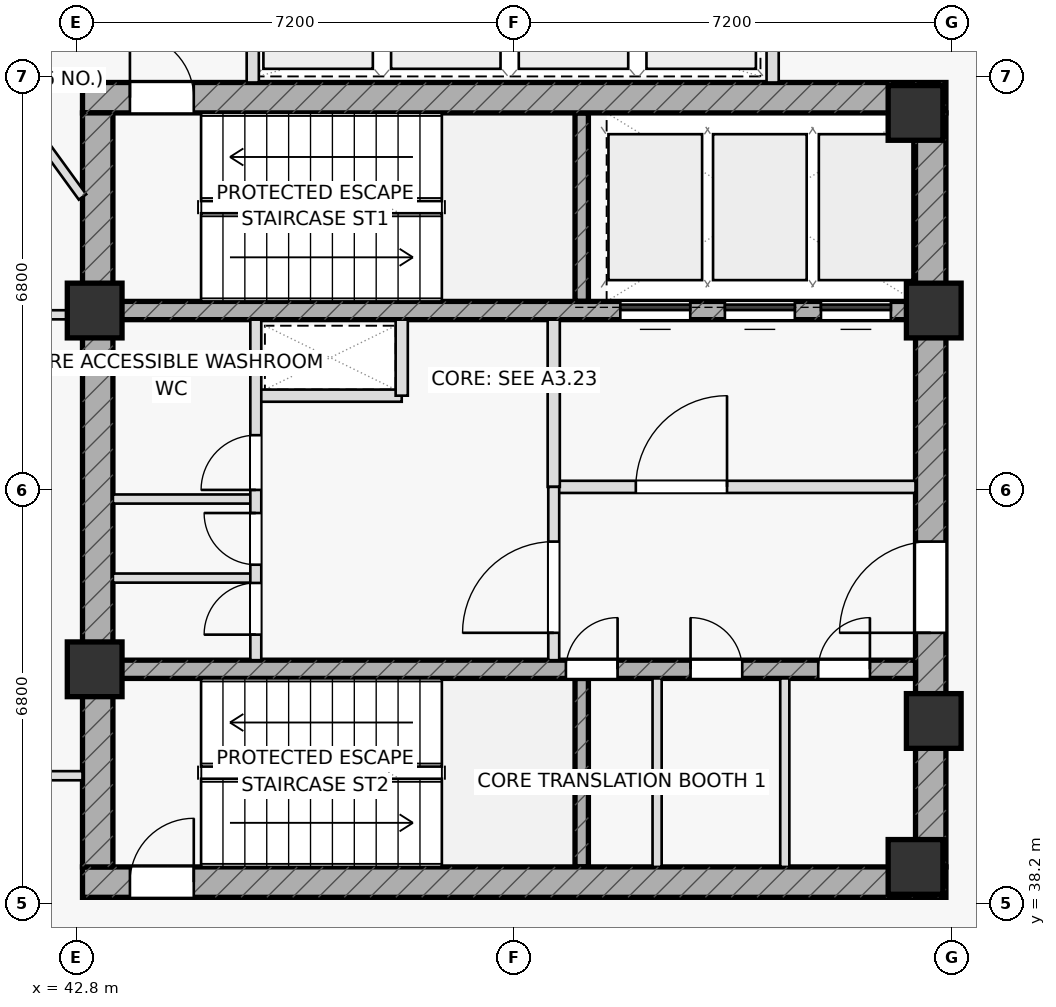
"""IFC4 building model, lengths in metres.
Left out: names, types, materials, properties, quantities, classifications, styles, units other than length and angle.
Written with IfcOpenShell. Run it as: python <this file> out.ifc"""

import sys

from ifc_helpers import new_model, si_unit, direction, frame, frame_2d, origin, origin_2d, place, context, subcontext, project, spatial, rectangle, extrude, element, fill, save


model = new_model("IFC4")
c1 = context("Model", 3, precision=1e-05, world=origin(), true_north=direction((0.0, 1.0)))
c2 = subcontext(c1, "Body", "Model", "MODEL_VIEW")
j1 = project(units=[si_unit("LENGTHUNIT", "METRE"), si_unit("PLANEANGLEUNIT", "RADIAN")], contexts=[c1])
p1 = place(None, origin())
s1 = spatial("IfcSite", under=j1, at=p1, CompositionType="ELEMENT")
p2 = place(p1, origin())
s2 = spatial("IfcBuilding", under=s1, at=p2, CompositionType="ELEMENT")
p3 = place(p2, frame((0.0, 0.0, 273.5)))
s3 = spatial("IfcBuildingStorey", under=s2, at=p3, CompositionType="ELEMENT", Elevation=273.5)
for number, where, z_axis, x_axis in (
    (1, (51.11, 48.1, 0.0), (0.0, 0.0, 1.0), (0.0, 1.0, 0.0)),
    (2, (51.11, 38.8, 0.0), (0.0, 0.0, 1.0), (0.0, 1.0, 0.0)),
):
    element("IfcWall", number, at=place(p3, frame(where, z_axis=z_axis, x_axis=x_axis)), inside=s3, PredefinedType="SHEAR", context=c2, shape_type="SweptSolid", body=[
        extrude(rectangle(XDim=3.1, YDim=0.22, at=frame_2d((1.55, 0.0))), origin(), (0.0, 0.0, 1.0), 3.7),
    ])
p4 = place(p3, frame((42.9, 51.45, 0.0), z_axis=(0.0, 0.0, 1.0), x_axis=(1.0, 0.0, 0.0)))
e3 = element("IfcWall", 3, at=p4, inside=s3, PredefinedType="SHEAR", context=c2, shape_type="SweptSolid", body=[
    extrude(rectangle(XDim=14.2, YDim=0.5, at=frame_2d((7.1, 0.0))), origin(), (0.0, 0.0, 1.0), 3.7),
])
p5 = place(p4, frame((0.78, 0.0, 0.0)))
e4 = element("IfcOpeningElement", 4, at=p5, cuts=e3, PredefinedType="OPENING", context=c2, shape_type="SweptSolid", body=[
    extrude(rectangle(XDim=1.05, YDim=2.2, at=frame_2d((0.525, 1.1))), frame((0.0, 0.26, 0.0), z_axis=(0.0, -1.0, 0.0), x_axis=(1.0, 0.0, 0.0)), (0.0, 0.0, 1.0), 0.52),
])
p6 = place(p3, frame((42.9, 38.55, 0.0), z_axis=(0.0, 0.0, 1.0), x_axis=(1.0, 0.0, 0.0)))
e5 = element("IfcWall", 5, at=p6, inside=s3, PredefinedType="SHEAR", context=c2, shape_type="SweptSolid", body=[
    extrude(rectangle(XDim=14.2, YDim=0.5, at=frame_2d((7.1, 0.0))), origin(), (0.0, 0.0, 1.0), 3.7),
])
p7 = place(p6, frame((0.78, 0.0, 0.0)))
e6 = element("IfcOpeningElement", 6, at=p7, cuts=e5, PredefinedType="OPENING", context=c2, shape_type="SweptSolid", body=[
    extrude(rectangle(XDim=1.05, YDim=2.2, at=frame_2d((0.525, 1.1))), frame((0.0, 0.26, 0.0), z_axis=(0.0, -1.0, 0.0), x_axis=(1.0, 0.0, 0.0)), (0.0, 0.0, 1.0), 0.52),
])
p8 = place(p3, frame((43.15, 38.8, 0.0), z_axis=(0.0, 0.0, 1.0), x_axis=(0.0, 1.0, 0.0)))
e7 = element("IfcWall", 7, at=p8, inside=s3, PredefinedType="SHEAR", context=c2, shape_type="SweptSolid", body=[
    extrude(rectangle(XDim=12.4, YDim=0.5, at=frame_2d((6.2, 0.0))), origin(), (0.0, 0.0, 1.0), 3.7),
])
p9 = place(p3, frame((56.85, 38.8, 0.0), z_axis=(0.0, 0.0, 1.0), x_axis=(0.0, 1.0, 0.0)))
e8 = element("IfcWall", 8, at=p9, inside=s3, PredefinedType="SHEAR", context=c2, shape_type="SweptSolid", body=[
    extrude(rectangle(XDim=12.4, YDim=0.5, at=frame_2d((6.2, 0.0))), origin(), (0.0, 0.0, 1.0), 3.7),
])
p10 = place(p9, frame((3.85, 0.0, 0.0)))
e9 = element("IfcOpeningElement", 9, at=p10, cuts=e8, PredefinedType="OPENING", context=c2, shape_type="SweptSolid", body=[
    extrude(rectangle(XDim=1.5, YDim=2.2, at=frame_2d((0.75, 1.1))), frame((0.0, 0.26, 0.0), z_axis=(0.0, -1.0, 0.0), x_axis=(1.0, 0.0, 0.0)), (0.0, 0.0, 1.0), 0.52),
])
p11 = place(p3, frame((43.4, 47.95, 0.0), z_axis=(0.0, 0.0, 1.0), x_axis=(1.0, 0.0, 0.0)))
e10 = element("IfcWall", 10, at=p11, inside=s3, PredefinedType="SHEAR", context=c2, shape_type="SweptSolid", body=[
    extrude(rectangle(XDim=13.2, YDim=0.3, at=frame_2d((6.6, 0.0))), origin(), (0.0, 0.0, 1.0), 3.7),
])
p12 = place(p11, frame((8.345, 0.0, 0.0)))
e11 = element("IfcOpeningElement", 11, at=p12, cuts=e10, PredefinedType="OPENING", context=c2, shape_type="SweptSolid", body=[
    extrude(rectangle(XDim=1.15, YDim=2.2, at=frame_2d((0.575, 1.1))), frame((0.0, 0.16, 0.0), z_axis=(0.0, -1.0, 0.0), x_axis=(1.0, 0.0, 0.0)), (0.0, 0.0, 1.0), 0.32),
])
p13 = place(p11, frame((10.065, 0.0, 0.0)))
e12 = element("IfcOpeningElement", 12, at=p13, cuts=e10, PredefinedType="OPENING", context=c2, shape_type="SweptSolid", body=[
    extrude(rectangle(XDim=1.15, YDim=2.2, at=frame_2d((0.575, 1.1))), frame((0.0, 0.16, 0.0), z_axis=(0.0, -1.0, 0.0), x_axis=(1.0, 0.0, 0.0)), (0.0, 0.0, 1.0), 0.32),
])
p14 = place(p11, frame((11.645, 0.0, 0.0)))
e13 = element("IfcOpeningElement", 13, at=p14, cuts=e10, PredefinedType="OPENING", context=c2, shape_type="SweptSolid", body=[
    extrude(rectangle(XDim=1.15, YDim=2.2, at=frame_2d((0.575, 1.1))), frame((0.0, 0.16, 0.0), z_axis=(0.0, -1.0, 0.0), x_axis=(1.0, 0.0, 0.0)), (0.0, 0.0, 1.0), 0.32),
])
p15 = place(p3, frame((43.4, 42.05, 0.0), z_axis=(0.0, 0.0, 1.0), x_axis=(1.0, 0.0, 0.0)))
e14 = element("IfcWall", 14, at=p15, inside=s3, PredefinedType="SHEAR", context=c2, shape_type="SweptSolid", body=[
    extrude(rectangle(XDim=13.2, YDim=0.3, at=frame_2d((6.6, 0.0))), origin(), (0.0, 0.0, 1.0), 3.7),
])
p16 = place(p15, frame((7.45, 0.0, 0.0)))
e15 = element("IfcOpeningElement", 15, at=p16, cuts=e14, PredefinedType="OPENING", context=c2, shape_type="SweptSolid", body=[
    extrude(rectangle(XDim=0.85, YDim=2.05, at=frame_2d((0.425, 1.025))), frame((0.0, 0.16, 0.0), z_axis=(0.0, -1.0, 0.0), x_axis=(1.0, 0.0, 0.0)), (0.0, 0.0, 1.0), 0.32),
])
p17 = place(p15, frame((9.5, 0.0, 0.0)))
e16 = element("IfcOpeningElement", 16, at=p17, cuts=e14, PredefinedType="OPENING", context=c2, shape_type="SweptSolid", body=[
    extrude(rectangle(XDim=0.85, YDim=2.05, at=frame_2d((0.425, 1.025))), frame((0.0, 0.16, 0.0), z_axis=(0.0, -1.0, 0.0), x_axis=(1.0, 0.0, 0.0)), (0.0, 0.0, 1.0), 0.32),
])
p18 = place(p15, frame((11.6, 0.0, 0.0)))
e17 = element("IfcOpeningElement", 17, at=p18, cuts=e14, PredefinedType="OPENING", context=c2, shape_type="SweptSolid", body=[
    extrude(rectangle(XDim=0.85, YDim=2.05, at=frame_2d((0.425, 1.025))), frame((0.0, 0.16, 0.0), z_axis=(0.0, -1.0, 0.0), x_axis=(1.0, 0.0, 0.0)), (0.0, 0.0, 1.0), 0.32),
])
for number, where, z_axis, x_axis in (
    (18, (43.1, 47.95, 0.0), (0.0, 0.0, 1.0), (1.0, 0.0, 0.0)),
    (19, (56.9, 47.95, 0.0), (0.0, 0.0, 1.0), (1.0, 0.0, 0.0)),
    (20, (56.6, 51.2, 0.0), (0.0, 0.0, 1.0), (1.0, 0.0, 0.0)),
    (21, (43.1, 42.05, 0.0), (0.0, 0.0, 1.0), (1.0, 0.0, 0.0)),
    (22, (56.9, 41.2, 0.0), (0.0, 0.0, 1.0), (1.0, 0.0, 0.0)),
    (23, (56.6, 38.8, 0.0), (0.0, 0.0, 1.0), (1.0, 0.0, 0.0)),
):
    element("IfcColumn", number, at=place(p3, frame(where, z_axis=z_axis, x_axis=x_axis)), inside=s3, PredefinedType="COLUMN", context=c2, shape_type="SweptSolid", body=[
        extrude(rectangle(XDim=0.9, YDim=0.9, at=origin_2d()), origin(), (0.0, 0.0, 1.0), 3.7),
    ])
for number, where, z_axis, x_axis in (
    (24, (45.7, 51.7, 0.0), (0.0, 0.0, 1.0), (0.0, 1.0, 0.0)),
    (25, (54.25, 51.7, 0.0), (0.0, 0.0, 1.0), (0.0, 1.0, 0.0)),
):
    element("IfcWall", number, at=place(p3, frame(where, z_axis=z_axis, x_axis=x_axis)), inside=s3, PredefinedType="PARTITIONING", context=c2, shape_type="SweptSolid", body=[
        extrude(rectangle(XDim=2.6, YDim=0.2, at=frame_2d((1.3, 0.0))), origin(), (0.0, 0.0, 1.0), 3.7),
    ])
p19 = place(p3, frame((45.75, 46.55, 0.0), z_axis=(0.0, 0.0, 1.0), x_axis=(1.0, 0.0, 0.0)))
e26 = element("IfcWall", 26, at=p19, inside=s3, PredefinedType="PARTITIONING", context=c2, shape_type="SweptSolid", body=[
    extrude(rectangle(XDim=2.4, YDim=0.2, at=frame_2d((1.2, 0.0))), origin(), (0.0, 0.0, 1.0), 3.7),
])
p20 = place(p3, frame((48.15, 46.55, 0.0), z_axis=(0.0, 0.0, 1.0), x_axis=(0.0, 1.0, 0.0)))
e27 = element("IfcWall", 27, at=p20, inside=s3, PredefinedType="PARTITIONING", context=c2, shape_type="SweptSolid", body=[
    extrude(rectangle(XDim=1.25, YDim=0.2, at=frame_2d((0.625, 0.0))), origin(), (0.0, 0.0, 1.0), 3.7),
])
p21 = place(p3, frame((50.65, 45.05, 0.0), z_axis=(0.0, 0.0, 1.0), x_axis=(1.0, 0.0, 0.0)))
e28 = element("IfcWall", 28, at=p21, inside=s3, PredefinedType="PARTITIONING", context=c2, shape_type="SweptSolid", body=[
    extrude(rectangle(XDim=5.95, YDim=0.2, at=frame_2d((2.975, 0.0))), origin(), (0.0, 0.0, 1.0), 3.7),
])
p22 = place(p21, frame((1.35, 0.0, 0.0)))
e29 = element("IfcOpeningElement", 29, at=p22, cuts=e28, PredefinedType="OPENING", context=c2, shape_type="SweptSolid", body=[
    extrude(rectangle(XDim=1.5, YDim=2.2, at=frame_2d((0.75, 1.1))), frame((0.0, 0.11, 0.0), z_axis=(0.0, -1.0, 0.0), x_axis=(1.0, 0.0, 0.0)), (0.0, 0.0, 1.0), 0.22),
])
p23 = place(p3, frame((50.65, 45.05, 0.0), z_axis=(0.0, 0.0, 1.0), x_axis=(0.0, 1.0, 0.0)))
e30 = element("IfcWall", 30, at=p23, inside=s3, PredefinedType="PARTITIONING", context=c2, shape_type="SweptSolid", body=[
    extrude(rectangle(XDim=2.75, YDim=0.2, at=frame_2d((1.375, 0.0))), origin(), (0.0, 0.0, 1.0), 3.7),
])
p24 = place(p3, frame((50.65, 42.2, 0.0), z_axis=(0.0, 0.0, 1.0), x_axis=(0.0, 1.0, 0.0)))
e31 = element("IfcWall", 31, at=p24, inside=s3, PredefinedType="PARTITIONING", context=c2, shape_type="SweptSolid", body=[
    extrude(rectangle(XDim=2.85, YDim=0.18, at=frame_2d((1.425, 0.0))), origin(), (0.0, 0.0, 1.0), 3.7),
])
p25 = place(p24, frame((0.45, 0.0, 0.0)))
e32 = element("IfcOpeningElement", 32, at=p25, cuts=e31, PredefinedType="OPENING", context=c2, shape_type="SweptSolid", body=[
    extrude(rectangle(XDim=1.5, YDim=2.2, at=frame_2d((0.75, 1.1))), frame((0.0, 0.1, 0.0), z_axis=(0.0, -1.0, 0.0), x_axis=(1.0, 0.0, 0.0)), (0.0, 0.0, 1.0), 0.2),
])
for number, where, z_axis, x_axis in (
    (33, (52.35, 38.8, 0.0), (0.0, 0.0, 1.0), (0.0, 1.0, 0.0)),
    (34, (54.45, 38.8, 0.0), (0.0, 0.0, 1.0), (0.0, 1.0, 0.0)),
):
    element("IfcWall", number, at=place(p3, frame(where, z_axis=z_axis, x_axis=x_axis)), inside=s3, PredefinedType="PARTITIONING", context=c2, shape_type="SweptSolid", body=[
        extrude(rectangle(XDim=3.1, YDim=0.15, at=frame_2d((1.55, 0.0))), origin(), (0.0, 0.0, 1.0), 3.7),
    ])
for number, where, z_axis, x_axis in (
    (35, (43.4, 43.55, 0.0), (0.0, 0.0, 1.0), (1.0, 0.0, 0.0)),
    (36, (43.4, 44.85, 0.0), (0.0, 0.0, 1.0), (1.0, 0.0, 0.0)),
):
    element("IfcWall", number, at=place(p3, frame(where, z_axis=z_axis, x_axis=x_axis)), inside=s3, PredefinedType="PARTITIONING", context=c2, shape_type="SweptSolid", body=[
        extrude(rectangle(XDim=2.35, YDim=0.15, at=frame_2d((1.175, 0.0))), origin(), (0.0, 0.0, 1.0), 3.7),
    ])
p26 = place(p3, frame((45.75, 42.2, 0.0), z_axis=(0.0, 0.0, 1.0), x_axis=(0.0, 1.0, 0.0)))
e37 = element("IfcWall", 37, at=p26, inside=s3, PredefinedType="PARTITIONING", context=c2, shape_type="SweptSolid", body=[
    extrude(rectangle(XDim=5.6, YDim=0.18, at=frame_2d((2.8, 0.0))), origin(), (0.0, 0.0, 1.0), 3.7),
])
p27 = place(p26, frame((0.42, 0.0, 0.0)))
e38 = element("IfcOpeningElement", 38, at=p27, cuts=e37, PredefinedType="OPENING", context=c2, shape_type="SweptSolid", body=[
    extrude(rectangle(XDim=0.85, YDim=2.05, at=frame_2d((0.425, 1.025))), frame((0.0, 0.1, 0.0), z_axis=(0.0, -1.0, 0.0), x_axis=(1.0, 0.0, 0.0)), (0.0, 0.0, 1.0), 0.2),
])
p28 = place(p26, frame((1.57, 0.0, 0.0)))
e39 = element("IfcOpeningElement", 39, at=p28, cuts=e37, PredefinedType="OPENING", context=c2, shape_type="SweptSolid", body=[
    extrude(rectangle(XDim=0.85, YDim=2.05, at=frame_2d((0.425, 1.025))), frame((0.0, 0.1, 0.0), z_axis=(0.0, -1.0, 0.0), x_axis=(1.0, 0.0, 0.0)), (0.0, 0.0, 1.0), 0.2),
])
p29 = place(p26, frame((2.8, 0.0, 0.0)))
e40 = element("IfcOpeningElement", 40, at=p29, cuts=e37, PredefinedType="OPENING", context=c2, shape_type="SweptSolid", body=[
    extrude(rectangle(XDim=0.9, YDim=2.05, at=frame_2d((0.45, 1.025))), frame((0.0, 0.1, 0.0), z_axis=(0.0, -1.0, 0.0), x_axis=(1.0, 0.0, 0.0)), (0.0, 0.0, 1.0), 0.2),
])
p30 = place(p3, frame((37.14, 40.3, 0.0), z_axis=(0.0, 0.0, 1.0), x_axis=(1.0, 0.0, 0.0)))
e41 = element("IfcWall", 41, at=p30, inside=s3, PredefinedType="PARTITIONING", context=c2, shape_type="SweptSolid", body=[
    extrude(rectangle(XDim=5.76, YDim=0.15, at=frame_2d((2.88, 0.0))), origin(), (0.0, 0.0, 1.0), 3.175),
])
p31 = place(p30, frame((3.21, 0.0, 0.0)))
e42 = element("IfcOpeningElement", 42, at=p31, cuts=e41, PredefinedType="OPENING", context=c2, shape_type="SweptSolid", body=[
    extrude(rectangle(XDim=0.95, YDim=2.05, at=frame_2d((0.475, 1.025))), frame((0.0, 0.085, 0.0), z_axis=(0.0, -1.0, 0.0), x_axis=(1.0, 0.0, 0.0)), (0.0, 0.0, 1.0), 0.17),
])
p32 = place(p3, frame((37.14, 47.88, 0.0), z_axis=(0.0, 0.0, 1.0), x_axis=(1.0, 0.0, 0.0)))
e43 = element("IfcWall", 43, at=p32, inside=s3, PredefinedType="PARTITIONING", context=c2, shape_type="SweptSolid", body=[
    extrude(rectangle(XDim=5.76, YDim=0.15, at=frame_2d((2.88, 0.0))), origin(), (0.0, 0.0, 1.0), 3.7),
])
p33 = place(p3, frame((42.9, 49.817, 0.0), z_axis=(0.0, 0.0, 1.0), x_axis=(-0.587778112671, 0.809022181565, 0.0)))
e44 = element("IfcWall", 44, at=p33, inside=s3, PredefinedType="PARTITIONING", context=c2, shape_type="SweptSolid", body=[
    extrude(rectangle(XDim=15.715, YDim=0.15, at=frame_2d((7.857, 0.0))), origin(), (0.0, 0.0, 1.0), 3.175),
])
p34 = place(p33, frame((1.35, 0.0, 0.0)))
e45 = element("IfcOpeningElement", 45, at=p34, cuts=e44, PredefinedType="OPENING", context=c2, shape_type="SweptSolid", body=[
    extrude(rectangle(XDim=0.95, YDim=2.05, at=frame_2d((0.475, 1.025))), frame((0.0, 0.085, 0.0), z_axis=(0.0, -1.0, 0.0), x_axis=(1.0, 0.0, 0.0)), (0.0, 0.0, 1.0), 0.17),
])
p35 = place(p5, origin())
e46 = element("IfcDoor", 46, at=p35, inside=s3, OperationType="SINGLE_SWING_LEFT", PredefinedType="DOOR", context=c2, shape_type="SweptSolid", body=[
    extrude(rectangle(XDim=1.05, YDim=2.2, at=frame_2d((0.525, 1.1))), frame((0.0, 0.025, 0.0), z_axis=(0.0, -1.0, 0.0), x_axis=(1.0, 0.0, 0.0)), (0.0, 0.0, 1.0), 0.05),
])
fill(e4, e46)
p36 = place(p7, origin())
e47 = element("IfcDoor", 47, at=p36, inside=s3, OperationType="SINGLE_SWING_RIGHT", PredefinedType="DOOR", context=c2, shape_type="SweptSolid", body=[
    extrude(rectangle(XDim=1.05, YDim=2.2, at=frame_2d((0.525, 1.1))), frame((0.0, 0.025, 0.0), z_axis=(0.0, -1.0, 0.0), x_axis=(1.0, 0.0, 0.0)), (0.0, 0.0, 1.0), 0.05),
])
fill(e6, e47)
p37 = place(p10, origin())
e48 = element("IfcDoor", 48, at=p37, inside=s3, OperationType="SINGLE_SWING_LEFT", PredefinedType="DOOR", context=c2, shape_type="SweptSolid", body=[
    extrude(rectangle(XDim=1.5, YDim=2.2, at=frame_2d((0.75, 1.1))), frame((0.0, 0.025, 0.0), z_axis=(0.0, -1.0, 0.0), x_axis=(1.0, 0.0, 0.0)), (0.0, 0.0, 1.0), 0.05),
])
fill(e9, e48)
p38 = place(p22, origin())
e49 = element("IfcDoor", 49, at=p38, inside=s3, OperationType="SINGLE_SWING_RIGHT", PredefinedType="DOOR", context=c2, shape_type="SweptSolid", body=[
    extrude(rectangle(XDim=1.5, YDim=2.2, at=frame_2d((0.75, 1.1))), frame((0.0, 0.025, 0.0), z_axis=(0.0, -1.0, 0.0), x_axis=(1.0, 0.0, 0.0)), (0.0, 0.0, 1.0), 0.05),
])
fill(e29, e49)
p39 = place(p25, origin())
e50 = element("IfcDoor", 50, at=p39, inside=s3, OperationType="SINGLE_SWING_LEFT", PredefinedType="DOOR", context=c2, shape_type="SweptSolid", body=[
    extrude(rectangle(XDim=1.5, YDim=2.2, at=frame_2d((0.75, 1.1))), frame((0.0, 0.025, 0.0), z_axis=(0.0, -1.0, 0.0), x_axis=(1.0, 0.0, 0.0)), (0.0, 0.0, 1.0), 0.05),
])
fill(e32, e50)
p40 = place(p16, origin())
e51 = element("IfcDoor", 51, at=p40, inside=s3, OperationType="SINGLE_SWING_RIGHT", PredefinedType="DOOR", context=c2, shape_type="SweptSolid", body=[
    extrude(rectangle(XDim=0.85, YDim=2.05, at=frame_2d((0.425, 1.025))), frame((0.0, 0.025, 0.0), z_axis=(0.0, -1.0, 0.0), x_axis=(1.0, 0.0, 0.0)), (0.0, 0.0, 1.0), 0.05),
])
fill(e15, e51)
p41 = place(p17, origin())
e52 = element("IfcDoor", 52, at=p41, inside=s3, OperationType="SINGLE_SWING_LEFT", PredefinedType="DOOR", context=c2, shape_type="SweptSolid", body=[
    extrude(rectangle(XDim=0.85, YDim=2.05, at=frame_2d((0.425, 1.025))), frame((0.0, 0.025, 0.0), z_axis=(0.0, -1.0, 0.0), x_axis=(1.0, 0.0, 0.0)), (0.0, 0.0, 1.0), 0.05),
])
fill(e16, e52)
p42 = place(p18, origin())
e53 = element("IfcDoor", 53, at=p42, inside=s3, OperationType="SINGLE_SWING_RIGHT", PredefinedType="DOOR", context=c2, shape_type="SweptSolid", body=[
    extrude(rectangle(XDim=0.85, YDim=2.05, at=frame_2d((0.425, 1.025))), frame((0.0, 0.025, 0.0), z_axis=(0.0, -1.0, 0.0), x_axis=(1.0, 0.0, 0.0)), (0.0, 0.0, 1.0), 0.05),
])
fill(e17, e53)
p43 = place(p27, origin())
e54 = element("IfcDoor", 54, at=p43, inside=s3, OperationType="SINGLE_SWING_LEFT", PredefinedType="DOOR", context=c2, shape_type="SweptSolid", body=[
    extrude(rectangle(XDim=0.85, YDim=2.05, at=frame_2d((0.425, 1.025))), frame((0.0, 0.025, 0.0), z_axis=(0.0, -1.0, 0.0), x_axis=(1.0, 0.0, 0.0)), (0.0, 0.0, 1.0), 0.05),
])
fill(e38, e54)
p44 = place(p28, origin())
e55 = element("IfcDoor", 55, at=p44, inside=s3, OperationType="SINGLE_SWING_RIGHT", PredefinedType="DOOR", context=c2, shape_type="SweptSolid", body=[
    extrude(rectangle(XDim=0.85, YDim=2.05, at=frame_2d((0.425, 1.025))), frame((0.0, 0.025, 0.0), z_axis=(0.0, -1.0, 0.0), x_axis=(1.0, 0.0, 0.0)), (0.0, 0.0, 1.0), 0.05),
])
fill(e39, e55)
p45 = place(p29, origin())
e56 = element("IfcDoor", 56, at=p45, inside=s3, OperationType="SINGLE_SWING_LEFT", PredefinedType="DOOR", context=c2, shape_type="SweptSolid", body=[
    extrude(rectangle(XDim=0.9, YDim=2.05, at=frame_2d((0.45, 1.025))), frame((0.0, 0.025, 0.0), z_axis=(0.0, -1.0, 0.0), x_axis=(1.0, 0.0, 0.0)), (0.0, 0.0, 1.0), 0.05),
])
fill(e40, e56)
p46 = place(p12, origin())
e57 = element("IfcDoor", 57, at=p46, inside=s3, OperationType="SLIDING_TO_LEFT", PredefinedType="DOOR", context=c2, shape_type="SweptSolid", body=[
    extrude(rectangle(XDim=1.15, YDim=2.2, at=frame_2d((0.575, 1.1))), frame((0.0, 0.025, 0.0), z_axis=(0.0, -1.0, 0.0), x_axis=(1.0, 0.0, 0.0)), (0.0, 0.0, 1.0), 0.05),
])
fill(e11, e57)
p47 = place(p13, origin())
e58 = element("IfcDoor", 58, at=p47, inside=s3, OperationType="SLIDING_TO_LEFT", PredefinedType="DOOR", context=c2, shape_type="SweptSolid", body=[
    extrude(rectangle(XDim=1.15, YDim=2.2, at=frame_2d((0.575, 1.1))), frame((0.0, 0.025, 0.0), z_axis=(0.0, -1.0, 0.0), x_axis=(1.0, 0.0, 0.0)), (0.0, 0.0, 1.0), 0.05),
])
fill(e12, e58)
p48 = place(p14, origin())
e59 = element("IfcDoor", 59, at=p48, inside=s3, OperationType="SLIDING_TO_LEFT", PredefinedType="DOOR", context=c2, shape_type="SweptSolid", body=[
    extrude(rectangle(XDim=1.15, YDim=2.2, at=frame_2d((0.575, 1.1))), frame((0.0, 0.025, 0.0), z_axis=(0.0, -1.0, 0.0), x_axis=(1.0, 0.0, 0.0)), (0.0, 0.0, 1.0), 0.05),
])
fill(e13, e59)
save(model, sys.argv[1])
